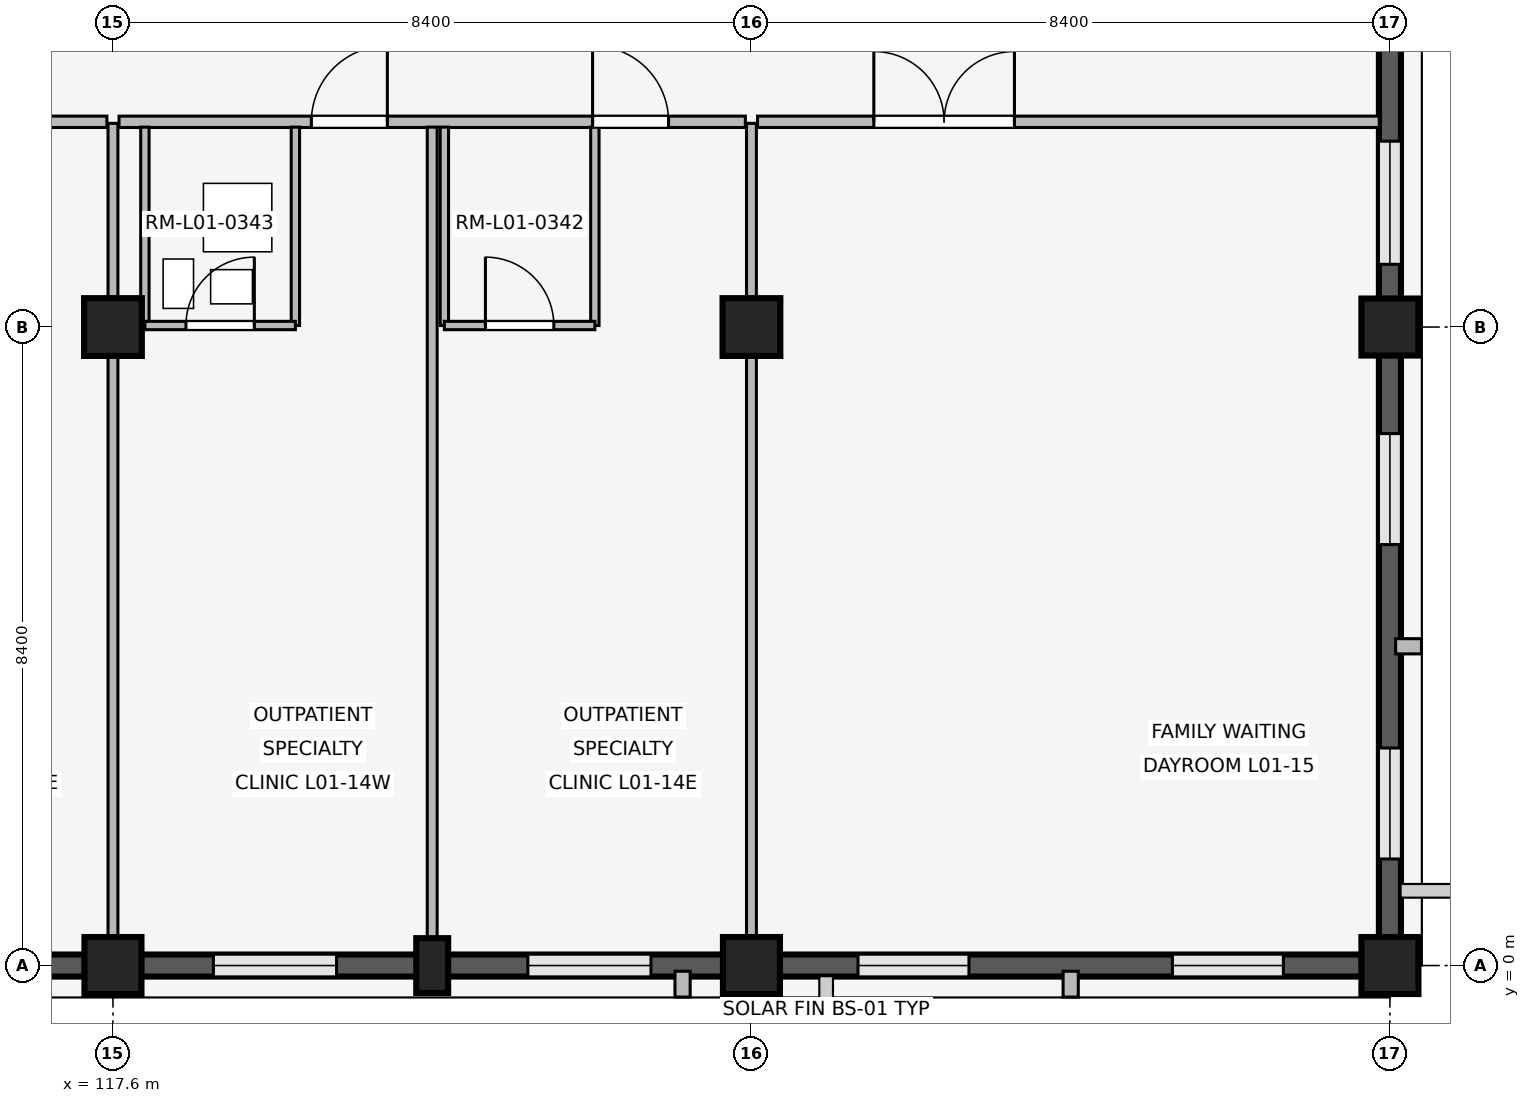
"""IFC4 building model, lengths in metres.
Left out: names, types, materials, properties, quantities, classifications, styles, units other than length and angle.
Written with IfcOpenShell. Run it as: python <this file> out.ifc"""

import sys

from ifc_helpers import new_model, si_unit, direction, frame, frame_2d, origin, origin_2d, place, context, subcontext, project, spatial, rectangle, extrude, element, fill, save


model = new_model("IFC4")
c1 = context("Model", 3, precision=1e-05, world=origin(), true_north=direction((0.0, 1.0)))
c2 = subcontext(c1, "Body", "Model", "MODEL_VIEW")
j1 = project(units=[si_unit("LENGTHUNIT", "METRE"), si_unit("PLANEANGLEUNIT", "RADIAN")], contexts=[c1])
p1 = place(None, origin())
s1 = spatial("IfcSite", under=j1, at=p1, CompositionType="ELEMENT")
p2 = place(p1, origin())
s2 = spatial("IfcBuilding", under=s1, at=p2, CompositionType="ELEMENT")
p3 = place(p2, frame((0.0, 0.0, 4.8)))
s3 = spatial("IfcBuildingStorey", under=s2, at=p3, CompositionType="ELEMENT", Elevation=4.8)
p4 = place(p3, frame((117.6, 0.0, 0.0), z_axis=(0.0, 0.0, 1.0), x_axis=(1.0, 0.0, 0.0)))
e1 = element("IfcColumn", 1, at=p4, inside=s3, PredefinedType="COLUMN", context=c2, shape_type="SweptSolid", body=[
    extrude(rectangle(XDim=0.75, YDim=0.75, at=origin_2d()), origin(), (0.0, 0.0, 1.0), 3.3),
])
p5 = place(p3, frame((117.6, 8.4, 0.0), z_axis=(0.0, 0.0, 1.0), x_axis=(1.0, 0.0, 0.0)))
e2 = element("IfcColumn", 2, at=p5, inside=s3, PredefinedType="COLUMN", context=c2, shape_type="SweptSolid", body=[
    extrude(rectangle(XDim=0.76, YDim=0.76, at=origin_2d()), origin(), (0.0, 0.0, 1.0), 3.3),
])
p6 = place(p3, frame((126.0, 0.0, 0.0), z_axis=(0.0, 0.0, 1.0), x_axis=(1.0, 0.0, 0.0)))
e3 = element("IfcColumn", 3, at=p6, inside=s3, PredefinedType="COLUMN", context=c2, shape_type="SweptSolid", body=[
    extrude(rectangle(XDim=0.75, YDim=0.75, at=origin_2d()), origin(), (0.0, 0.0, 1.0), 3.3),
])
p7 = place(p3, frame((126.0, 8.4, 0.0), z_axis=(0.0, 0.0, 1.0), x_axis=(1.0, 0.0, 0.0)))
e4 = element("IfcColumn", 4, at=p7, inside=s3, PredefinedType="COLUMN", context=c2, shape_type="SweptSolid", body=[
    extrude(rectangle(XDim=0.76, YDim=0.76, at=origin_2d()), origin(), (0.0, 0.0, 1.0), 3.3),
])
for number, where, z_axis, x_axis in (
    (5, (134.4, 0.0, 0.0), (0.0, 0.0, 1.0), (1.0, 0.0, 0.0)),
    (6, (134.4, 8.4, 0.0), (0.0, 0.0, 1.0), (1.0, 0.0, 0.0)),
):
    element("IfcColumn", number, at=place(p3, frame(where, z_axis=z_axis, x_axis=x_axis)), inside=s3, PredefinedType="COLUMN", context=c2, shape_type="SweptSolid", body=[
        extrude(rectangle(XDim=0.75, YDim=0.75, at=origin_2d()), origin(), (0.0, 0.0, 1.0), 3.3),
    ])
p8 = place(p3, frame((121.8, 0.0, 0.0), z_axis=(0.0, 0.0, 1.0), x_axis=(1.0, 0.0, 0.0)))
e7 = element("IfcColumn", 7, at=p8, inside=s3, PredefinedType="PILASTER", context=c2, shape_type="SweptSolid", body=[
    extrude(rectangle(XDim=0.42, YDim=0.72, at=origin_2d()), origin(), (0.0, 0.0, 1.0), 3.3),
])
p9 = place(p3, frame((117.23, 0.0, 0.0), z_axis=(0.0, 0.0, 1.0), x_axis=(-1.0, 0.0, 0.0)))
e8 = element("IfcWall", 8, at=p9, inside=s3, PredefinedType="SOLIDWALL", context=c2, shape_type="SweptSolid", body=[
    extrude(rectangle(XDim=7.66, YDim=0.29, at=frame_2d((3.83, 0.0))), origin(), (0.0, 0.0, 1.0), 2.42),
])
p10 = place(p9, frame((1.032, 0.0, 0.85)))
e9 = element("IfcOpeningElement", 9, at=p10, cuts=e8, PredefinedType="OPENING", context=c2, shape_type="SweptSolid", body=[
    extrude(rectangle(XDim=1.46, YDim=0.85, at=frame_2d((0.73, 0.425))), frame((0.0, 0.155, 0.0), z_axis=(0.0, -1.0, 0.0), x_axis=(1.0, 0.0, 0.0)), (0.0, 0.0, 1.0), 0.31),
])
p11 = place(p9, frame((5.168, 0.0, 0.85)))
e10 = element("IfcOpeningElement", 10, at=p11, cuts=e8, PredefinedType="OPENING", context=c2, shape_type="SweptSolid", body=[
    extrude(rectangle(XDim=1.46, YDim=0.85, at=frame_2d((0.73, 0.425))), frame((0.0, 0.155, 0.0), z_axis=(0.0, -1.0, 0.0), x_axis=(1.0, 0.0, 0.0)), (0.0, 0.0, 1.0), 0.31),
])
p12 = place(p3, frame((125.63, 0.0, 0.0), z_axis=(0.0, 0.0, 1.0), x_axis=(-1.0, 0.0, 0.0)))
e11 = element("IfcWall", 11, at=p12, inside=s3, PredefinedType="SOLIDWALL", context=c2, shape_type="SweptSolid", body=[
    extrude(rectangle(XDim=7.66, YDim=0.29, at=frame_2d((3.83, 0.0))), origin(), (0.0, 0.0, 1.0), 2.42),
])
p13 = place(p12, frame((0.952, 0.0, 0.85)))
e12 = element("IfcOpeningElement", 12, at=p13, cuts=e11, PredefinedType="OPENING", context=c2, shape_type="SweptSolid", body=[
    extrude(rectangle(XDim=1.62, YDim=0.95, at=frame_2d((0.81, 0.475))), frame((0.0, 0.155, 0.0), z_axis=(0.0, -1.0, 0.0), x_axis=(1.0, 0.0, 0.0)), (0.0, 0.0, 1.0), 0.31),
])
p14 = place(p12, frame((5.088, 0.0, 0.85)))
e13 = element("IfcOpeningElement", 13, at=p14, cuts=e11, PredefinedType="OPENING", context=c2, shape_type="SweptSolid", body=[
    extrude(rectangle(XDim=1.62, YDim=0.95, at=frame_2d((0.81, 0.475))), frame((0.0, 0.155, 0.0), z_axis=(0.0, -1.0, 0.0), x_axis=(1.0, 0.0, 0.0)), (0.0, 0.0, 1.0), 0.31),
])
p15 = place(p3, frame((125.094, -0.075, 0.0), z_axis=(0.0, 0.0, 1.0), x_axis=(0.0, -1.0, 0.0)))
e14 = element("IfcWall", 14, at=p15, inside=s3, PredefinedType="ELEMENTEDWALL", context=c2, shape_type="SweptSolid", body=[
    extrude(rectangle(XDim=0.34, YDim=0.2, at=frame_2d((0.17, 0.0))), origin(), (0.0, 0.0, 1.0), 2.4),
])
p16 = place(p3, frame((134.03, 0.0, 0.0), z_axis=(0.0, 0.0, 1.0), x_axis=(-1.0, 0.0, 0.0)))
e15 = element("IfcWall", 15, at=p16, inside=s3, PredefinedType="SOLIDWALL", context=c2, shape_type="SweptSolid", body=[
    extrude(rectangle(XDim=7.66, YDim=0.29, at=frame_2d((3.83, 0.0))), origin(), (0.0, 0.0, 1.0), 2.42),
])
p17 = place(p16, frame((1.032, 0.0, 0.85)))
e16 = element("IfcOpeningElement", 16, at=p17, cuts=e15, PredefinedType="OPENING", context=c2, shape_type="SweptSolid", body=[
    extrude(rectangle(XDim=1.46, YDim=0.85, at=frame_2d((0.73, 0.425))), frame((0.0, 0.155, 0.0), z_axis=(0.0, -1.0, 0.0), x_axis=(1.0, 0.0, 0.0)), (0.0, 0.0, 1.0), 0.31),
])
p18 = place(p16, frame((5.168, 0.0, 0.85)))
e17 = element("IfcOpeningElement", 17, at=p18, cuts=e15, PredefinedType="OPENING", context=c2, shape_type="SweptSolid", body=[
    extrude(rectangle(XDim=1.46, YDim=0.85, at=frame_2d((0.73, 0.425))), frame((0.0, 0.155, 0.0), z_axis=(0.0, -1.0, 0.0), x_axis=(1.0, 0.0, 0.0)), (0.0, 0.0, 1.0), 0.31),
])
p19 = place(p3, frame((130.2, -0.075, 0.0), z_axis=(0.0, 0.0, 1.0), x_axis=(0.0, -1.0, 0.0)))
e18 = element("IfcWall", 18, at=p19, inside=s3, PredefinedType="ELEMENTEDWALL", context=c2, shape_type="SweptSolid", body=[
    extrude(rectangle(XDim=0.34, YDim=0.2, at=frame_2d((0.17, 0.0))), origin(), (0.0, 0.0, 1.0), 2.4),
])
p20 = place(p3, frame((134.4, 8.03, 0.0), z_axis=(0.0, 0.0, 1.0), x_axis=(0.0, -1.0, 0.0)))
e19 = element("IfcWall", 19, at=p20, inside=s3, PredefinedType="SOLIDWALL", context=c2, shape_type="SweptSolid", body=[
    extrude(rectangle(XDim=7.66, YDim=0.29, at=frame_2d((3.83, 0.0))), origin(), (0.0, 0.0, 1.0), 2.42),
])
p21 = place(p20, frame((1.032, 0.0, 0.85)))
e20 = element("IfcOpeningElement", 20, at=p21, cuts=e19, PredefinedType="OPENING", context=c2, shape_type="SweptSolid", body=[
    extrude(rectangle(XDim=1.46, YDim=0.85, at=frame_2d((0.73, 0.425))), frame((0.0, 0.155, 0.0), z_axis=(0.0, -1.0, 0.0), x_axis=(1.0, 0.0, 0.0)), (0.0, 0.0, 1.0), 0.31),
])
p22 = place(p20, frame((5.168, 0.0, 0.85)))
e21 = element("IfcOpeningElement", 21, at=p22, cuts=e19, PredefinedType="OPENING", context=c2, shape_type="SweptSolid", body=[
    extrude(rectangle(XDim=1.46, YDim=0.85, at=frame_2d((0.73, 0.425))), frame((0.0, 0.155, 0.0), z_axis=(0.0, -1.0, 0.0), x_axis=(1.0, 0.0, 0.0)), (0.0, 0.0, 1.0), 0.31),
])
p23 = place(p3, frame((134.475, 4.2, 0.0), z_axis=(0.0, 0.0, 1.0), x_axis=(1.0, 0.0, 0.0)))
e22 = element("IfcWall", 22, at=p23, inside=s3, PredefinedType="ELEMENTEDWALL", context=c2, shape_type="SweptSolid", body=[
    extrude(rectangle(XDim=0.34, YDim=0.2, at=frame_2d((0.17, 0.0))), origin(), (0.0, 0.0, 1.0), 2.4),
])
p24 = place(p3, frame((134.4, 16.43, 0.0), z_axis=(0.0, 0.0, 1.0), x_axis=(0.0, -1.0, 0.0)))
e23 = element("IfcWall", 23, at=p24, inside=s3, PredefinedType="SOLIDWALL", context=c2, shape_type="SweptSolid", body=[
    extrude(rectangle(XDim=7.66, YDim=0.29, at=frame_2d((3.83, 0.0))), origin(), (0.0, 0.0, 1.0), 2.42),
])
p25 = place(p24, frame((0.455, 0.0, 0.85)))
e24 = element("IfcOpeningElement", 24, at=p25, cuts=e23, PredefinedType="OPENING", context=c2, shape_type="SweptSolid", body=[
    extrude(rectangle(XDim=1.62, YDim=0.95, at=frame_2d((0.81, 0.475))), frame((0.0, 0.155, 0.0), z_axis=(0.0, -1.0, 0.0), x_axis=(1.0, 0.0, 0.0)), (0.0, 0.0, 1.0), 0.31),
])
p26 = place(p24, frame((5.585, 0.0, 0.85)))
e25 = element("IfcOpeningElement", 25, at=p26, cuts=e23, PredefinedType="OPENING", context=c2, shape_type="SweptSolid", body=[
    extrude(rectangle(XDim=1.62, YDim=0.95, at=frame_2d((0.81, 0.475))), frame((0.0, 0.155, 0.0), z_axis=(0.0, -1.0, 0.0), x_axis=(1.0, 0.0, 0.0)), (0.0, 0.0, 1.0), 0.31),
])
p27 = place(p3, frame((109.28, 11.1, 0.0), z_axis=(0.0, 0.0, 1.0), x_axis=(1.0, 0.0, 0.0)))
e26 = element("IfcWall", 26, at=p27, inside=s3, PredefinedType="PARTITIONING", context=c2, shape_type="SweptSolid", body=[
    extrude(rectangle(XDim=8.24, YDim=0.15, at=frame_2d((4.12, 0.0))), origin(), (0.0, 0.0, 1.0), 2.4),
])
p28 = place(p27, frame((2.53, 0.0, 0.0)))
e27 = element("IfcOpeningElement", 27, at=p28, cuts=e26, PredefinedType="OPENING", context=c2, shape_type="SweptSolid", body=[
    extrude(rectangle(XDim=1.0, YDim=2.15, at=frame_2d((0.5, 1.075))), frame((0.0, 0.085, 0.0), z_axis=(0.0, -1.0, 0.0), x_axis=(1.0, 0.0, 0.0)), (0.0, 0.0, 1.0), 0.17),
])
p29 = place(p27, frame((6.23, 0.0, 0.0)))
e28 = element("IfcOpeningElement", 28, at=p29, cuts=e26, PredefinedType="OPENING", context=c2, shape_type="SweptSolid", body=[
    extrude(rectangle(XDim=1.0, YDim=2.15, at=frame_2d((0.5, 1.075))), frame((0.0, 0.085, 0.0), z_axis=(0.0, -1.0, 0.0), x_axis=(1.0, 0.0, 0.0)), (0.0, 0.0, 1.0), 0.17),
])
p30 = place(p3, frame((117.6, 0.14, 0.0), z_axis=(0.0, 0.0, 1.0), x_axis=(0.0, 1.0, 0.0)))
e29 = element("IfcWall", 29, at=p30, inside=s3, PredefinedType="PARTITIONING", context=c2, shape_type="SweptSolid", body=[
    extrude(rectangle(XDim=10.94, YDim=0.13, at=frame_2d((5.47, 0.0))), origin(), (0.0, 0.0, 1.0), 2.4),
])
p31 = place(p3, frame((117.68, 11.1, 0.0), z_axis=(0.0, 0.0, 1.0), x_axis=(1.0, 0.0, 0.0)))
e30 = element("IfcWall", 30, at=p31, inside=s3, PredefinedType="PARTITIONING", context=c2, shape_type="SweptSolid", body=[
    extrude(rectangle(XDim=8.24, YDim=0.15, at=frame_2d((4.12, 0.0))), origin(), (0.0, 0.0, 1.0), 2.4),
])
p32 = place(p31, frame((2.53, 0.0, 0.0)))
e31 = element("IfcOpeningElement", 31, at=p32, cuts=e30, PredefinedType="OPENING", context=c2, shape_type="SweptSolid", body=[
    extrude(rectangle(XDim=1.0, YDim=2.15, at=frame_2d((0.5, 1.075))), frame((0.0, 0.085, 0.0), z_axis=(0.0, -1.0, 0.0), x_axis=(1.0, 0.0, 0.0)), (0.0, 0.0, 1.0), 0.17),
])
p33 = place(p31, frame((6.23, 0.0, 0.0)))
e32 = element("IfcOpeningElement", 32, at=p33, cuts=e30, PredefinedType="OPENING", context=c2, shape_type="SweptSolid", body=[
    extrude(rectangle(XDim=1.0, YDim=2.15, at=frame_2d((0.5, 1.075))), frame((0.0, 0.085, 0.0), z_axis=(0.0, -1.0, 0.0), x_axis=(1.0, 0.0, 0.0)), (0.0, 0.0, 1.0), 0.17),
])
p34 = place(p3, frame((121.8, 0.1, 0.0), z_axis=(0.0, 0.0, 1.0), x_axis=(0.0, 1.0, 0.0)))
e33 = element("IfcWall", 33, at=p34, inside=s3, PredefinedType="PARTITIONING", context=c2, shape_type="SweptSolid", body=[
    extrude(rectangle(XDim=10.93, YDim=0.13, at=frame_2d((5.465, 0.0))), origin(), (0.0, 0.0, 1.0), 2.4),
])
for number, where, z_axis, x_axis in (
    (34, (118.02, 8.42, 0.0), (0.0, 0.0, 1.0), (0.0, 1.0, 0.0)),
    (35, (120.0, 8.42, 0.0), (0.0, 0.0, 1.0), (0.0, 1.0, 0.0)),
):
    element("IfcWall", number, at=place(p3, frame(where, z_axis=z_axis, x_axis=x_axis)), inside=s3, PredefinedType="PARTITIONING", context=c2, shape_type="SweptSolid", body=[
        extrude(rectangle(XDim=2.61, YDim=0.11, at=frame_2d((1.305, 0.0))), origin(), (0.0, 0.0, 1.0), 2.4),
    ])
p35 = place(p3, frame((118.02, 8.42, 0.0), z_axis=(0.0, 0.0, 1.0), x_axis=(1.0, 0.0, 0.0)))
e36 = element("IfcWall", 36, at=p35, inside=s3, PredefinedType="PARTITIONING", context=c2, shape_type="SweptSolid", body=[
    extrude(rectangle(XDim=1.98, YDim=0.11, at=frame_2d((0.99, 0.0))), origin(), (0.0, 0.0, 1.0), 2.4),
])
p36 = place(p35, frame((0.54, 0.0, 0.0)))
e37 = element("IfcOpeningElement", 37, at=p36, cuts=e36, PredefinedType="OPENING", context=c2, shape_type="SweptSolid", body=[
    extrude(rectangle(XDim=0.9, YDim=2.1, at=frame_2d((0.45, 1.05))), frame((0.0, 0.065, 0.0), z_axis=(0.0, -1.0, 0.0), x_axis=(1.0, 0.0, 0.0)), (0.0, 0.0, 1.0), 0.13),
])
for number, where, z_axis, x_axis in (
    (38, (121.96, 8.42, 0.0), (0.0, 0.0, 1.0), (0.0, 1.0, 0.0)),
    (39, (123.94, 8.42, 0.0), (0.0, 0.0, 1.0), (0.0, 1.0, 0.0)),
):
    element("IfcWall", number, at=place(p3, frame(where, z_axis=z_axis, x_axis=x_axis)), inside=s3, PredefinedType="PARTITIONING", context=c2, shape_type="SweptSolid", body=[
        extrude(rectangle(XDim=2.61, YDim=0.11, at=frame_2d((1.305, 0.0))), origin(), (0.0, 0.0, 1.0), 2.4),
    ])
p37 = place(p3, frame((121.96, 8.42, 0.0), z_axis=(0.0, 0.0, 1.0), x_axis=(1.0, 0.0, 0.0)))
e40 = element("IfcWall", 40, at=p37, inside=s3, PredefinedType="PARTITIONING", context=c2, shape_type="SweptSolid", body=[
    extrude(rectangle(XDim=1.98, YDim=0.11, at=frame_2d((0.99, 0.0))), origin(), (0.0, 0.0, 1.0), 2.4),
])
p38 = place(p37, frame((0.54, 0.0, 0.0)))
e41 = element("IfcOpeningElement", 41, at=p38, cuts=e40, PredefinedType="OPENING", context=c2, shape_type="SweptSolid", body=[
    extrude(rectangle(XDim=0.9, YDim=2.1, at=frame_2d((0.45, 1.05))), frame((0.0, 0.065, 0.0), z_axis=(0.0, -1.0, 0.0), x_axis=(1.0, 0.0, 0.0)), (0.0, 0.0, 1.0), 0.13),
])
p39 = place(p3, frame((126.0, 0.14, 0.0), z_axis=(0.0, 0.0, 1.0), x_axis=(0.0, 1.0, 0.0)))
e42 = element("IfcWall", 42, at=p39, inside=s3, PredefinedType="PARTITIONING", context=c2, shape_type="SweptSolid", body=[
    extrude(rectangle(XDim=10.94, YDim=0.13, at=frame_2d((5.47, 0.0))), origin(), (0.0, 0.0, 1.0), 2.4),
])
p40 = place(p3, frame((126.08, 11.1, 0.0), z_axis=(0.0, 0.0, 1.0), x_axis=(1.0, 0.0, 0.0)))
e43 = element("IfcWall", 43, at=p40, inside=s3, PredefinedType="PARTITIONING", context=c2, shape_type="SweptSolid", body=[
    extrude(rectangle(XDim=8.18, YDim=0.15, at=frame_2d((4.09, 0.0))), origin(), (0.0, 0.0, 1.0), 2.4),
])
p41 = place(p40, frame((1.53, 0.0, 0.0)))
e44 = element("IfcOpeningElement", 44, at=p41, cuts=e43, PredefinedType="OPENING", context=c2, shape_type="SweptSolid", body=[
    extrude(rectangle(XDim=1.85, YDim=2.3, at=frame_2d((0.925, 1.15))), frame((0.0, 0.085, 0.0), z_axis=(0.0, -1.0, 0.0), x_axis=(1.0, 0.0, 0.0)), (0.0, 0.0, 1.0), 0.17),
])
p42 = place(p13, origin())
e45 = element("IfcWindow", 45, at=p42, inside=s3, PartitioningType="SINGLE_PANEL", PredefinedType="WINDOW", context=c2, shape_type="SweptSolid", body=[
    extrude(rectangle(XDim=1.62, YDim=0.95, at=frame_2d((0.81, 0.475))), frame((0.0, 0.03, 0.0), z_axis=(0.0, -1.0, 0.0), x_axis=(1.0, 0.0, 0.0)), (0.0, 0.0, 1.0), 0.06),
])
fill(e12, e45)
p43 = place(p14, origin())
e46 = element("IfcWindow", 46, at=p43, inside=s3, PartitioningType="SINGLE_PANEL", PredefinedType="WINDOW", context=c2, shape_type="SweptSolid", body=[
    extrude(rectangle(XDim=1.62, YDim=0.95, at=frame_2d((0.81, 0.475))), frame((0.0, 0.03, 0.0), z_axis=(0.0, -1.0, 0.0), x_axis=(1.0, 0.0, 0.0)), (0.0, 0.0, 1.0), 0.06),
])
fill(e13, e46)
p44 = place(p17, origin())
e47 = element("IfcWindow", 47, at=p44, inside=s3, PartitioningType="SINGLE_PANEL", PredefinedType="WINDOW", context=c2, shape_type="SweptSolid", body=[
    extrude(rectangle(XDim=1.46, YDim=0.85, at=frame_2d((0.73, 0.425))), frame((0.0, 0.03, 0.0), z_axis=(0.0, -1.0, 0.0), x_axis=(1.0, 0.0, 0.0)), (0.0, 0.0, 1.0), 0.06),
])
fill(e16, e47)
p45 = place(p18, origin())
e48 = element("IfcWindow", 48, at=p45, inside=s3, PartitioningType="SINGLE_PANEL", PredefinedType="WINDOW", context=c2, shape_type="SweptSolid", body=[
    extrude(rectangle(XDim=1.46, YDim=0.85, at=frame_2d((0.73, 0.425))), frame((0.0, 0.03, 0.0), z_axis=(0.0, -1.0, 0.0), x_axis=(1.0, 0.0, 0.0)), (0.0, 0.0, 1.0), 0.06),
])
fill(e17, e48)
p46 = place(p21, origin())
e49 = element("IfcWindow", 49, at=p46, inside=s3, PartitioningType="SINGLE_PANEL", PredefinedType="WINDOW", context=c2, shape_type="SweptSolid", body=[
    extrude(rectangle(XDim=1.46, YDim=0.85, at=frame_2d((0.73, 0.425))), frame((0.0, 0.03, 0.0), z_axis=(0.0, -1.0, 0.0), x_axis=(1.0, 0.0, 0.0)), (0.0, 0.0, 1.0), 0.06),
])
fill(e20, e49)
p47 = place(p22, origin())
e50 = element("IfcWindow", 50, at=p47, inside=s3, PartitioningType="SINGLE_PANEL", PredefinedType="WINDOW", context=c2, shape_type="SweptSolid", body=[
    extrude(rectangle(XDim=1.46, YDim=0.85, at=frame_2d((0.73, 0.425))), frame((0.0, 0.03, 0.0), z_axis=(0.0, -1.0, 0.0), x_axis=(1.0, 0.0, 0.0)), (0.0, 0.0, 1.0), 0.06),
])
fill(e21, e50)
p48 = place(p26, origin())
e51 = element("IfcWindow", 51, at=p48, inside=s3, PartitioningType="SINGLE_PANEL", PredefinedType="WINDOW", context=c2, shape_type="SweptSolid", body=[
    extrude(rectangle(XDim=1.62, YDim=0.95, at=frame_2d((0.81, 0.475))), frame((0.0, 0.03, 0.0), z_axis=(0.0, -1.0, 0.0), x_axis=(1.0, 0.0, 0.0)), (0.0, 0.0, 1.0), 0.06),
])
fill(e25, e51)
p49 = place(p32, origin())
e52 = element("IfcDoor", 52, at=p49, inside=s3, OperationType="SINGLE_SWING_RIGHT", PredefinedType="DOOR", context=c2, shape_type="SweptSolid", body=[
    extrude(rectangle(XDim=1.0, YDim=2.15, at=frame_2d((0.5, 1.075))), frame((0.0, 0.025, 0.0), z_axis=(0.0, -1.0, 0.0), x_axis=(1.0, 0.0, 0.0)), (0.0, 0.0, 1.0), 0.05),
])
fill(e31, e52)
p50 = place(p33, origin())
e53 = element("IfcDoor", 53, at=p50, inside=s3, OperationType="SINGLE_SWING_LEFT", PredefinedType="DOOR", context=c2, shape_type="SweptSolid", body=[
    extrude(rectangle(XDim=1.0, YDim=2.15, at=frame_2d((0.5, 1.075))), frame((0.0, 0.025, 0.0), z_axis=(0.0, -1.0, 0.0), x_axis=(1.0, 0.0, 0.0)), (0.0, 0.0, 1.0), 0.05),
])
fill(e32, e53)
p51 = place(p36, origin())
e54 = element("IfcDoor", 54, at=p51, inside=s3, OperationType="SINGLE_SWING_RIGHT", PredefinedType="DOOR", context=c2, shape_type="SweptSolid", body=[
    extrude(rectangle(XDim=0.9, YDim=2.1, at=frame_2d((0.45, 1.05))), frame((0.0, 0.025, 0.0), z_axis=(0.0, -1.0, 0.0), x_axis=(1.0, 0.0, 0.0)), (0.0, 0.0, 1.0), 0.05),
])
fill(e37, e54)
p52 = place(p38, origin())
e55 = element("IfcDoor", 55, at=p52, inside=s3, OperationType="SINGLE_SWING_LEFT", PredefinedType="DOOR", context=c2, shape_type="SweptSolid", body=[
    extrude(rectangle(XDim=0.9, YDim=2.1, at=frame_2d((0.45, 1.05))), frame((0.0, 0.025, 0.0), z_axis=(0.0, -1.0, 0.0), x_axis=(1.0, 0.0, 0.0)), (0.0, 0.0, 1.0), 0.05),
])
fill(e41, e55)
p53 = place(p41, origin())
e56 = element("IfcDoor", 56, at=p53, inside=s3, OperationType="DOUBLE_SWING_LEFT", PredefinedType="DOOR", context=c2, shape_type="SweptSolid", body=[
    extrude(rectangle(XDim=1.85, YDim=2.3, at=frame_2d((0.925, 1.15))), frame((0.0, 0.025, 0.0), z_axis=(0.0, -1.0, 0.0), x_axis=(1.0, 0.0, 0.0)), (0.0, 0.0, 1.0), 0.05),
])
fill(e44, e56)
save(model, sys.argv[1])
